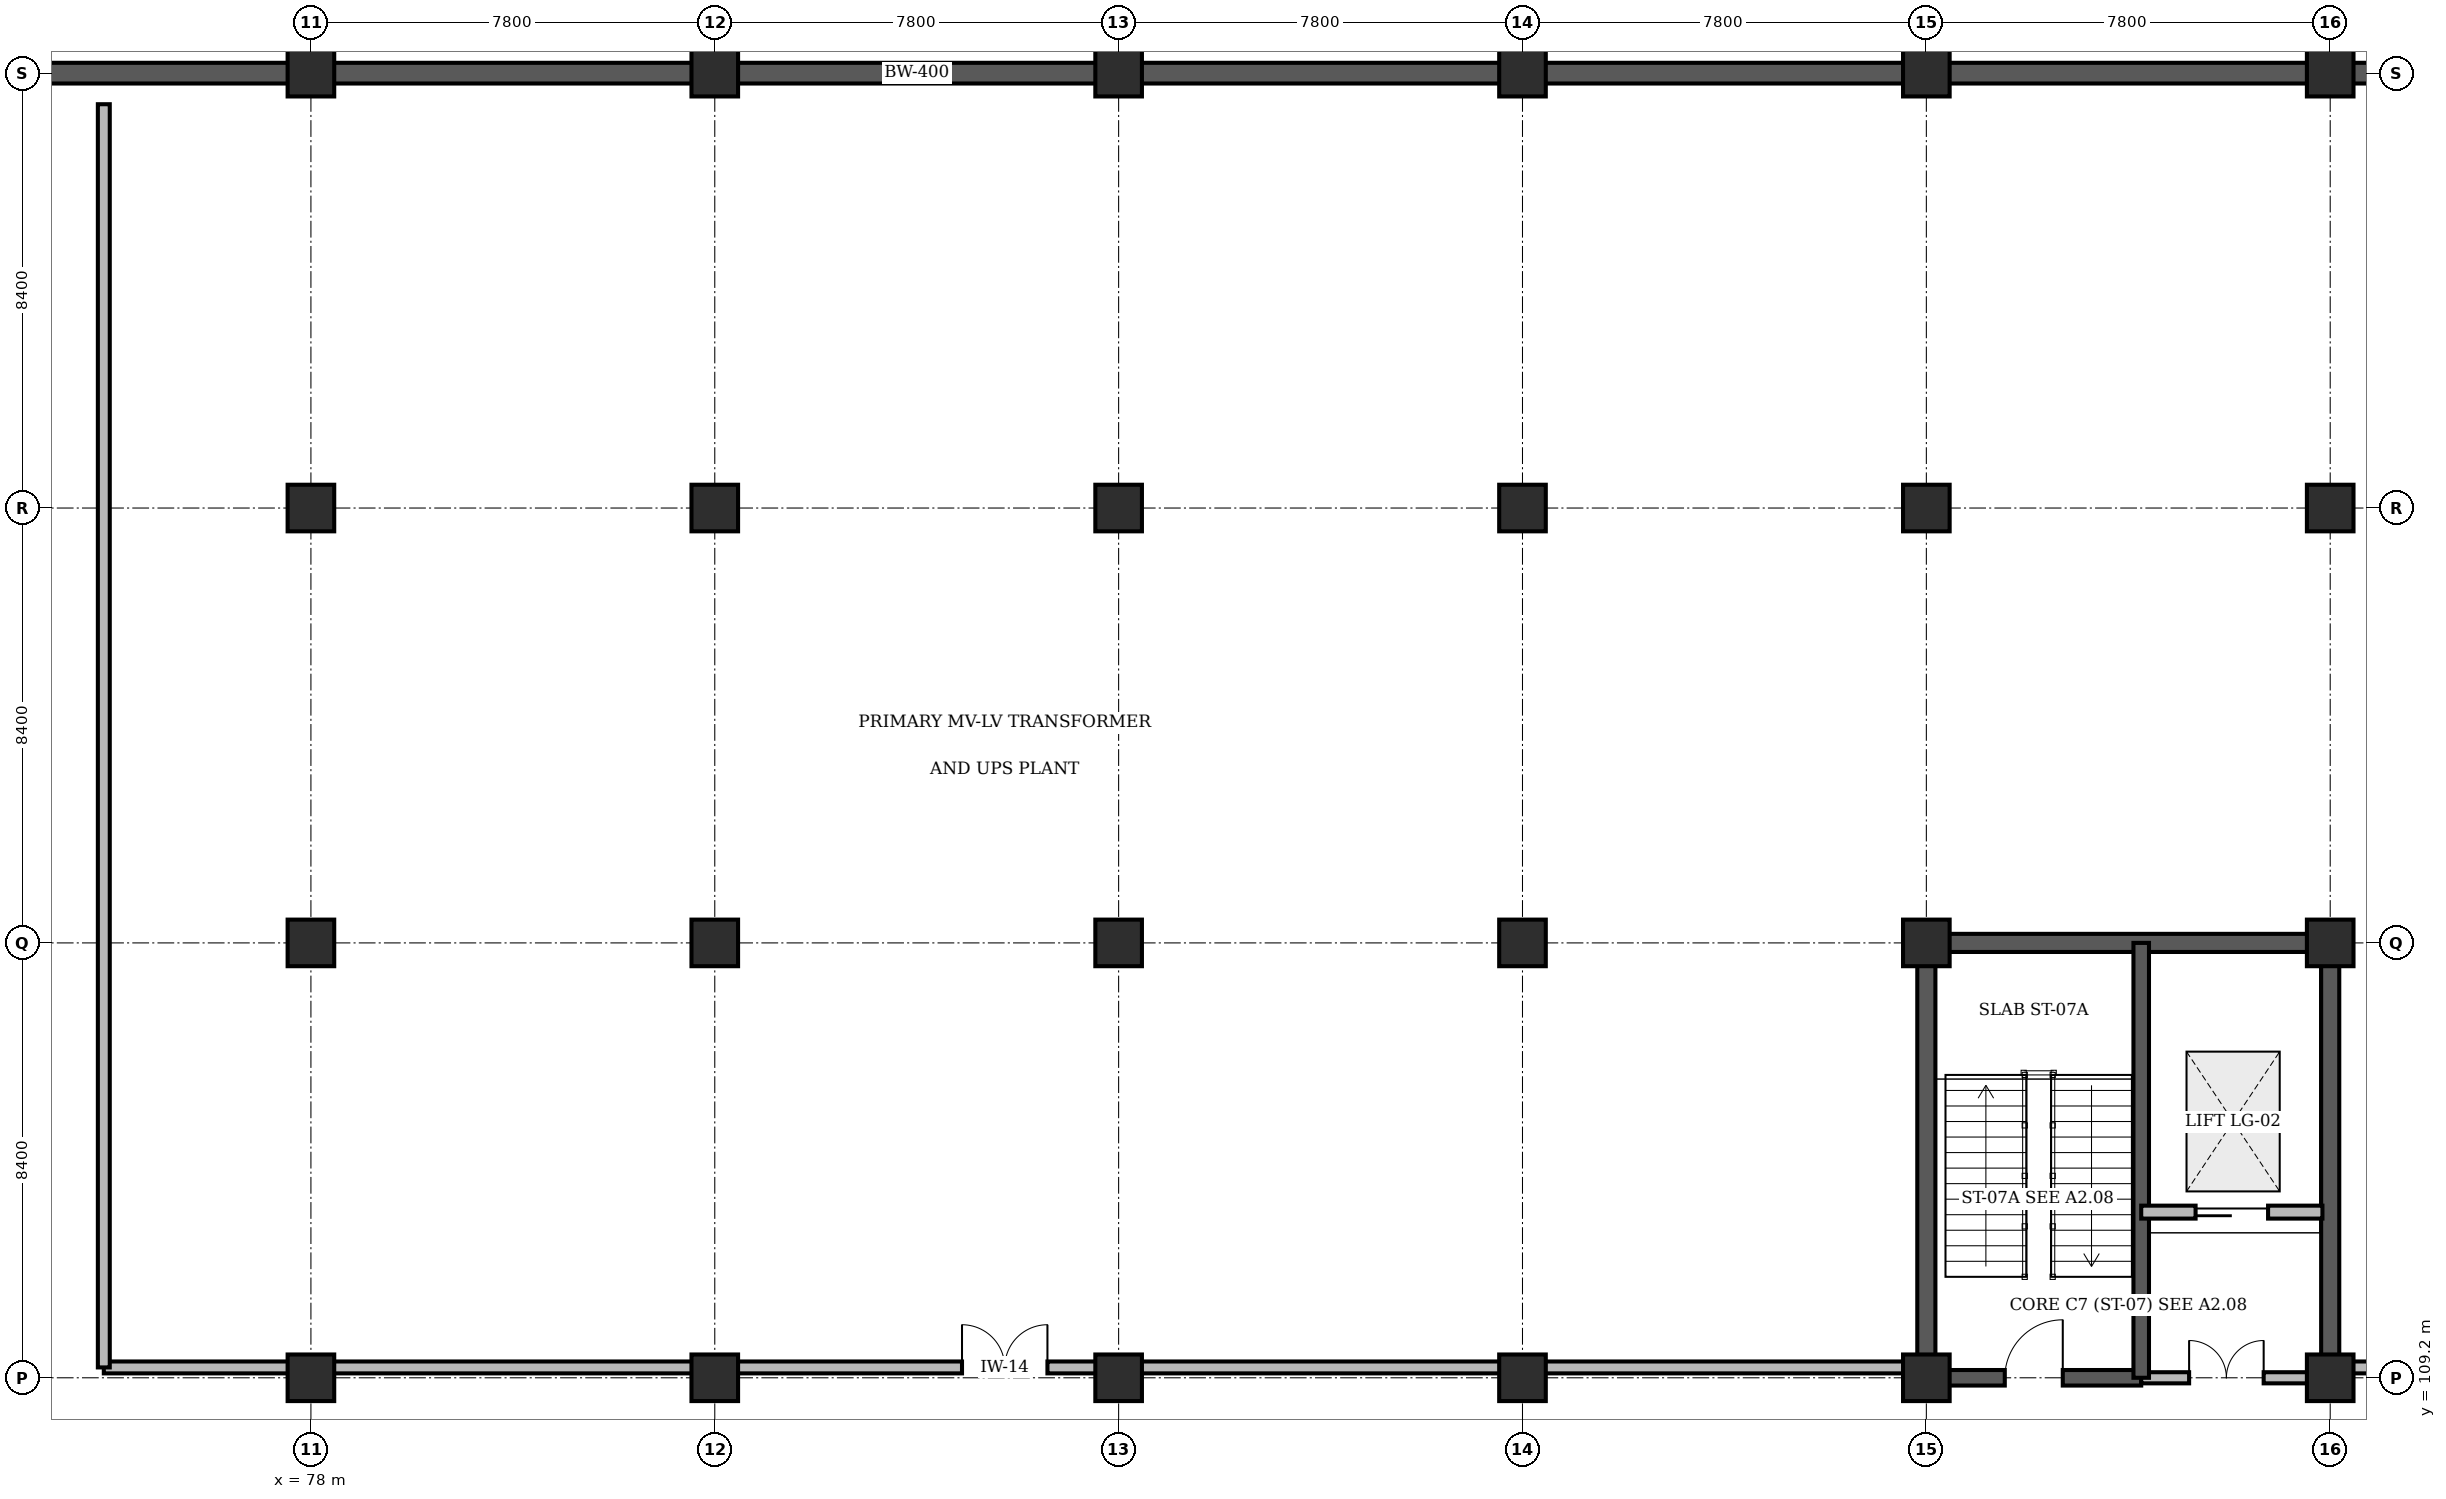
"""IFC4 building model, lengths in metres.
Left out: names, types, materials, properties, quantities, classifications, styles, units other than length and angle.
Written with IfcOpenShell. Run it as: python <this file> out.ifc"""

import sys

from ifc_helpers import new_model, si_unit, direction, frame, frame_2d, origin, origin_2d, place, context, subcontext, project, spatial, rectangle, extrude, element, fill, save


model = new_model("IFC4")
c1 = context("Model", 3, precision=1e-05, world=origin(), true_north=direction((0.0, 1.0)))
c2 = subcontext(c1, "Body", "Model", "MODEL_VIEW")
j1 = project(units=[si_unit("LENGTHUNIT", "METRE"), si_unit("PLANEANGLEUNIT", "RADIAN")], contexts=[c1])
p1 = place(None, origin())
s1 = spatial("IfcSite", under=j1, at=p1, CompositionType="ELEMENT")
p2 = place(p1, origin())
s2 = spatial("IfcBuilding", under=s1, at=p2, CompositionType="ELEMENT")
p3 = place(p2, frame((0.0, 0.0, -4.8)))
s3 = spatial("IfcBuildingStorey", under=s2, at=p3, CompositionType="ELEMENT", Elevation=-4.8)
p4 = place(p3, frame((109.025, 117.6, 0.0), z_axis=(0.0, 0.0, 1.0), x_axis=(1.0, 0.0, 0.0)))
e1 = element("IfcWall", 1, at=p4, inside=s3, PredefinedType="SHEAR", context=c2, shape_type="SweptSolid", body=[
    extrude(rectangle(XDim=8.15, YDim=0.35, at=frame_2d((4.075, 0.0))), origin(), (0.0, 0.0, 1.0), 4.4),
])
for number, where, z_axis, x_axis in (
    (2, (109.2, 109.2, 0.0), (0.0, 0.0, 1.0), (0.0, 1.0, 0.0)),
    (3, (117.0, 109.2, 0.0), (0.0, 0.0, 1.0), (0.0, 1.0, 0.0)),
):
    element("IfcWall", number, at=place(p3, frame(where, z_axis=z_axis, x_axis=x_axis)), inside=s3, PredefinedType="SHEAR", context=c2, shape_type="SweptSolid", body=[
        extrude(rectangle(XDim=8.4, YDim=0.35, at=frame_2d((4.2, 0.0))), origin(), (0.0, 0.0, 1.0), 4.4),
    ])
p5 = place(p3, frame((132.6, 134.4, 0.0), z_axis=(0.0, 0.0, 1.0), x_axis=(-1.0, 0.0, 0.0)))
e4 = element("IfcWall", 4, at=p5, inside=s3, PredefinedType="SOLIDWALL", context=c2, shape_type="SweptSolid", body=[
    extrude(rectangle(XDim=85.8, YDim=0.4, at=frame_2d((42.9, 0.0))), origin(), (0.0, 0.0, 1.0), 4.8),
])
for number, where, z_axis, x_axis in (
    (5, (78.0, 109.2, 0.0), (0.0, 0.0, 1.0), (1.0, 0.0, 0.0)),
    (6, (78.0, 117.6, 0.0), (0.0, 0.0, 1.0), (1.0, 0.0, 0.0)),
    (7, (78.0, 126.0, 0.0), (0.0, 0.0, 1.0), (1.0, 0.0, 0.0)),
    (8, (78.0, 134.4, 0.0), (0.0, 0.0, 1.0), (1.0, 0.0, 0.0)),
    (9, (85.8, 109.2, 0.0), (0.0, 0.0, 1.0), (1.0, 0.0, 0.0)),
    (10, (85.8, 117.6, 0.0), (0.0, 0.0, 1.0), (1.0, 0.0, 0.0)),
    (11, (85.8, 126.0, 0.0), (0.0, 0.0, 1.0), (1.0, 0.0, 0.0)),
    (12, (85.8, 134.4, 0.0), (0.0, 0.0, 1.0), (1.0, 0.0, 0.0)),
    (13, (93.6, 109.2, 0.0), (0.0, 0.0, 1.0), (1.0, 0.0, 0.0)),
    (14, (93.6, 117.6, 0.0), (0.0, 0.0, 1.0), (1.0, 0.0, 0.0)),
    (15, (93.6, 126.0, 0.0), (0.0, 0.0, 1.0), (1.0, 0.0, 0.0)),
    (16, (93.6, 134.4, 0.0), (0.0, 0.0, 1.0), (1.0, 0.0, 0.0)),
    (17, (101.4, 109.2, 0.0), (0.0, 0.0, 1.0), (1.0, 0.0, 0.0)),
    (18, (101.4, 117.6, 0.0), (0.0, 0.0, 1.0), (1.0, 0.0, 0.0)),
    (19, (101.4, 126.0, 0.0), (0.0, 0.0, 1.0), (1.0, 0.0, 0.0)),
    (20, (101.4, 134.4, 0.0), (0.0, 0.0, 1.0), (1.0, 0.0, 0.0)),
    (21, (109.2, 109.2, 0.0), (0.0, 0.0, 1.0), (1.0, 0.0, 0.0)),
    (22, (109.2, 117.6, 0.0), (0.0, 0.0, 1.0), (1.0, 0.0, 0.0)),
    (23, (109.2, 126.0, 0.0), (0.0, 0.0, 1.0), (1.0, 0.0, 0.0)),
    (24, (109.2, 134.4, 0.0), (0.0, 0.0, 1.0), (1.0, 0.0, 0.0)),
    (25, (117.0, 109.2, 0.0), (0.0, 0.0, 1.0), (1.0, 0.0, 0.0)),
    (26, (117.0, 117.6, 0.0), (0.0, 0.0, 1.0), (1.0, 0.0, 0.0)),
    (27, (117.0, 126.0, 0.0), (0.0, 0.0, 1.0), (1.0, 0.0, 0.0)),
    (28, (117.0, 134.4, 0.0), (0.0, 0.0, 1.0), (1.0, 0.0, 0.0)),
):
    element("IfcColumn", number, at=place(p3, frame(where, z_axis=z_axis, x_axis=x_axis)), inside=s3, PredefinedType="COLUMN", context=c2, shape_type="SweptSolid", body=[
        extrude(rectangle(XDim=0.9, YDim=0.9, at=origin_2d()), origin(), (0.0, 0.0, 1.0), 4.8),
    ])
p6 = place(p3, frame((109.2, 109.2, 0.0), z_axis=(0.0, 0.0, 1.0), x_axis=(1.0, 0.0, 0.0)))
e29 = element("IfcWall", 29, at=p6, inside=s3, PredefinedType="SHEAR", context=c2, shape_type="SweptSolid", body=[
    extrude(rectangle(XDim=4.15, YDim=0.3, at=frame_2d((2.075, 0.0))), origin(), (0.0, 0.0, 1.0), 4.8),
])
p7 = place(p6, frame((1.515, 0.0, 0.0)))
e30 = element("IfcOpeningElement", 30, at=p7, cuts=e29, PredefinedType="OPENING", context=c2, shape_type="SweptSolid", body=[
    extrude(rectangle(XDim=1.12, YDim=2.15, at=frame_2d((0.56, 1.075))), frame((0.0, 0.16, 0.0), z_axis=(0.0, -1.0, 0.0), x_axis=(1.0, 0.0, 0.0)), (0.0, 0.0, 1.0), 0.32),
])
p8 = place(p3, frame((113.35, 109.2, 0.0), z_axis=(0.0, 0.0, 1.0), x_axis=(1.0, 0.0, 0.0)))
e31 = element("IfcWall", 31, at=p8, inside=s3, PredefinedType="STANDARD", context=c2, shape_type="SweptSolid", body=[
    extrude(rectangle(XDim=3.29, YDim=0.215, at=frame_2d((1.645, 0.0))), origin(), (0.0, 0.0, 1.0), 3.53),
])
p9 = place(p8, frame((0.925, 0.0, 0.0)))
e32 = element("IfcOpeningElement", 32, at=p9, cuts=e31, PredefinedType="OPENING", context=c2, shape_type="SweptSolid", body=[
    extrude(rectangle(XDim=1.44, YDim=2.2, at=frame_2d((0.72, 1.1))), frame((0.0, 0.118, 0.0), z_axis=(0.0, -1.0, 0.0), x_axis=(1.0, 0.0, 0.0)), (0.0, 0.0, 1.0), 0.235),
])
p10 = place(p3, frame((113.35, 109.2, 0.0), z_axis=(0.0, 0.0, 1.0), x_axis=(0.0, 1.0, 0.0)))
e33 = element("IfcWall", 33, at=p10, inside=s3, PredefinedType="SHEAR", context=c2, shape_type="SweptSolid", body=[
    extrude(rectangle(XDim=8.4, YDim=0.3, at=frame_2d((4.2, 0.0))), origin(), (0.0, 0.0, 1.0), 4.8),
])
p11 = place(p3, frame((113.35, 112.4, 0.0), z_axis=(0.0, 0.0, 1.0), x_axis=(1.0, 0.0, 0.0)))
e34 = element("IfcWall", 34, at=p11, inside=s3, PredefinedType="STANDARD", context=c2, shape_type="SweptSolid", body=[
    extrude(rectangle(XDim=3.5, YDim=0.25, at=frame_2d((1.75, 0.0))), origin(), (0.0, 0.0, 1.0), 4.46),
])
p12 = place(p11, frame((1.05, 0.0, 0.0)))
e35 = element("IfcOpeningElement", 35, at=p12, cuts=e34, PredefinedType="OPENING", context=c2, shape_type="SweptSolid", body=[
    extrude(rectangle(XDim=1.4, YDim=2.2, at=frame_2d((0.7, 1.1))), frame((0.0, 0.135, 0.0), z_axis=(0.0, -1.0, 0.0), x_axis=(1.0, 0.0, 0.0)), (0.0, 0.0, 1.0), 0.27),
])
p13 = place(p3, frame((74.0, 109.4, 0.0), z_axis=(0.0, 0.0, 1.0), x_axis=(1.0, 0.0, 0.0)))
e36 = element("IfcWall", 36, at=p13, inside=s3, PredefinedType="STANDARD", context=c2, shape_type="SweptSolid", body=[
    extrude(rectangle(XDim=34.8, YDim=0.23, at=frame_2d((17.4, 0.0))), origin(), (0.0, 0.0, 1.0), 3.53),
])
p14 = place(p13, frame((16.575, 0.0, 0.0)))
e37 = element("IfcOpeningElement", 37, at=p14, cuts=e36, PredefinedType="OPENING", context=c2, shape_type="SweptSolid", body=[
    extrude(rectangle(XDim=1.65, YDim=2.25, at=frame_2d((0.825, 1.125))), frame((0.0, 0.125, 0.0), z_axis=(0.0, -1.0, 0.0), x_axis=(1.0, 0.0, 0.0)), (0.0, 0.0, 1.0), 0.25),
])
p15 = place(p3, frame((74.0, 109.4, 0.0), z_axis=(0.0, 0.0, 1.0), x_axis=(0.0, 1.0, 0.0)))
e38 = element("IfcWall", 38, at=p15, inside=s3, PredefinedType="STANDARD", context=c2, shape_type="SweptSolid", body=[
    extrude(rectangle(XDim=24.4, YDim=0.23, at=frame_2d((12.2, 0.0))), origin(), (0.0, 0.0, 1.0), 4.46),
])
p16 = place(p3, frame((117.4, 109.4, 0.0), z_axis=(0.0, 0.0, 1.0), x_axis=(1.0, 0.0, 0.0)))
e39 = element("IfcWall", 39, at=p16, inside=s3, PredefinedType="STANDARD", context=c2, shape_type="SweptSolid", body=[
    extrude(rectangle(XDim=14.8, YDim=0.23, at=frame_2d((7.4, 0.0))), origin(), (0.0, 0.0, 1.0), 3.53),
])
p17 = place(p16, frame((5.095, 0.0, 0.0)))
e40 = element("IfcOpeningElement", 40, at=p17, cuts=e39, PredefinedType="OPENING", context=c2, shape_type="SweptSolid", body=[
    extrude(rectangle(XDim=1.65, YDim=2.25, at=frame_2d((0.825, 1.125))), frame((0.0, 0.125, 0.0), z_axis=(0.0, -1.0, 0.0), x_axis=(1.0, 0.0, 0.0)), (0.0, 0.0, 1.0), 0.25),
])
p18 = place(p7, origin())
e41 = element("IfcDoor", 41, at=p18, inside=s3, OperationType="SINGLE_SWING_RIGHT", PredefinedType="DOOR", context=c2, shape_type="SweptSolid", body=[
    extrude(rectangle(XDim=1.12, YDim=2.15, at=frame_2d((0.56, 1.075))), frame((0.0, 0.025, 0.0), z_axis=(0.0, -1.0, 0.0), x_axis=(1.0, 0.0, 0.0)), (0.0, 0.0, 1.0), 0.05),
])
fill(e30, e41)
p19 = place(p9, origin())
e42 = element("IfcDoor", 42, at=p19, inside=s3, OperationType="DOUBLE_DOOR_SINGLE_SWING", PredefinedType="DOOR", context=c2, shape_type="SweptSolid", body=[
    extrude(rectangle(XDim=1.44, YDim=2.2, at=frame_2d((0.72, 1.1))), frame((0.0, 0.025, 0.0), z_axis=(0.0, -1.0, 0.0), x_axis=(1.0, 0.0, 0.0)), (0.0, 0.0, 1.0), 0.05),
])
fill(e32, e42)
p20 = place(p12, origin())
e43 = element("IfcDoor", 43, at=p20, inside=s3, OperationType="SLIDING_TO_LEFT", PredefinedType="DOOR", context=c2, shape_type="SweptSolid", body=[
    extrude(rectangle(XDim=1.4, YDim=2.2, at=frame_2d((0.7, 1.1))), frame((0.0, 0.025, 0.0), z_axis=(0.0, -1.0, 0.0), x_axis=(1.0, 0.0, 0.0)), (0.0, 0.0, 1.0), 0.05),
])
fill(e35, e43)
p21 = place(p14, origin())
e44 = element("IfcDoor", 44, at=p21, inside=s3, OperationType="DOUBLE_DOOR_SINGLE_SWING", PredefinedType="DOOR", context=c2, shape_type="SweptSolid", body=[
    extrude(rectangle(XDim=1.65, YDim=2.25, at=frame_2d((0.825, 1.125))), frame((0.0, 0.025, 0.0), z_axis=(0.0, -1.0, 0.0), x_axis=(1.0, 0.0, 0.0)), (0.0, 0.0, 1.0), 0.05),
])
fill(e37, e44)
save(model, sys.argv[1])
